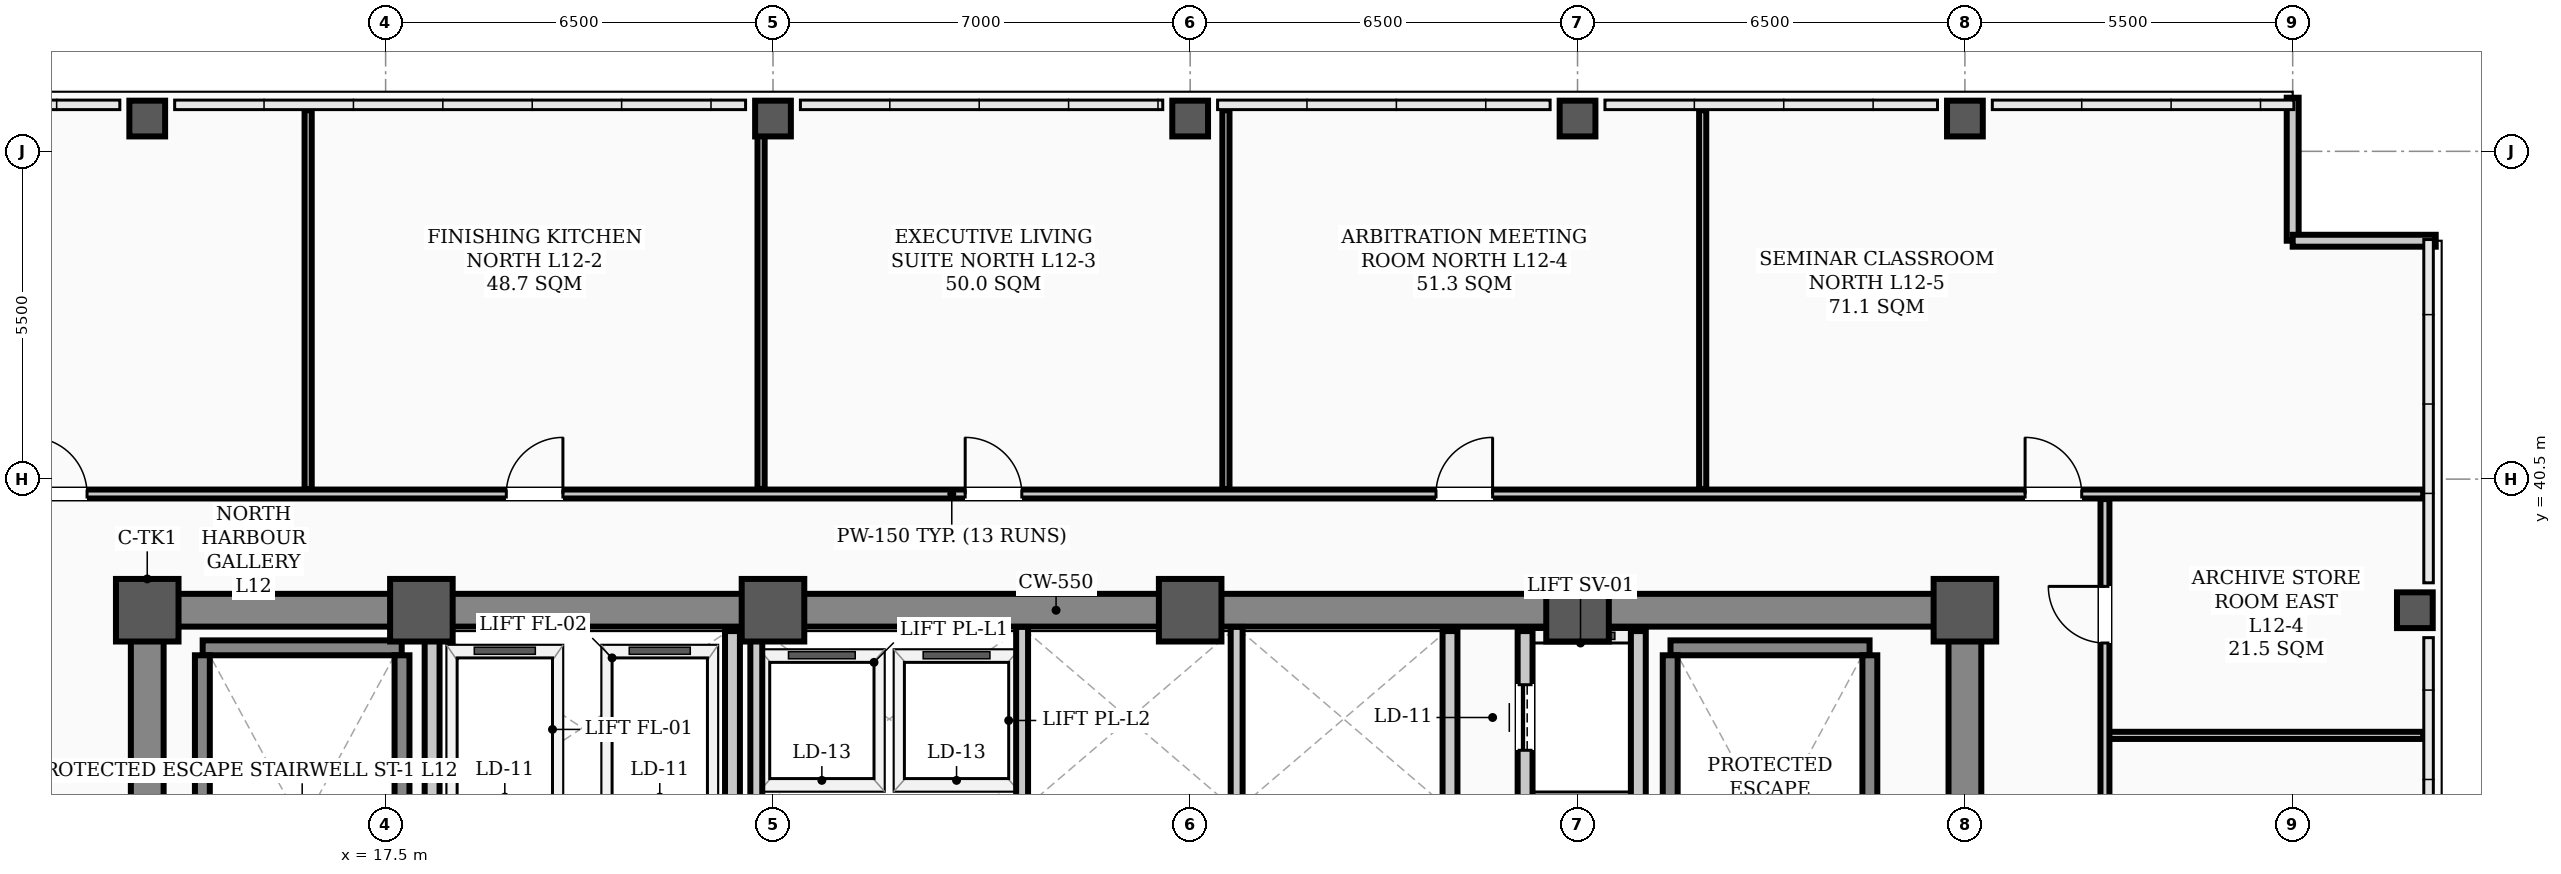
"""IFC4 building model, lengths in metres.
Left out: names, types, materials, properties, quantities, classifications, styles, units other than length and angle.
Written with IfcOpenShell. Run it as: python <this file> out.ifc"""

import sys

from ifc_helpers import new_model, si_unit, direction, frame, frame_2d, origin, origin_2d, place, context, subcontext, project, spatial, rectangle, hollow_rectangle, extrude, element, fill, save


model = new_model("IFC4")
c1 = context("Model", 3, precision=1e-05, world=origin(), true_north=direction((0.0, 1.0)))
c2 = subcontext(c1, "Body", "Model", "MODEL_VIEW")
j1 = project(units=[si_unit("LENGTHUNIT", "METRE"), si_unit("PLANEANGLEUNIT", "RADIAN")], contexts=[c1])
p1 = place(None, origin())
s1 = spatial("IfcSite", under=j1, at=p1, CompositionType="ELEMENT")
p2 = place(p1, origin())
s2 = spatial("IfcBuilding", under=s1, at=p2, CompositionType="ELEMENT")
p3 = place(p2, frame((0.0, 0.0, 49.9)))
s3 = spatial("IfcBuildingStorey", under=s2, at=p3, CompositionType="ELEMENT", Elevation=49.9)
for number, where, z_axis, x_axis in (
    (1, (13.5, 38.3, 0.0), (0.0, 0.0, 1.0), (1.0, 0.0, 0.0)),
    (2, (18.1, 38.3, 0.0), (0.0, 0.0, 1.0), (1.0, 0.0, 0.0)),
    (3, (24.0, 38.3, 0.0), (0.0, 0.0, 1.0), (1.0, 0.0, 0.0)),
    (4, (31.0, 38.3, 0.0), (0.0, 0.0, 1.0), (1.0, 0.0, 0.0)),
    (5, (37.5, 38.3, 0.0), (0.0, 0.0, 1.0), (1.0, 0.0, 0.0)),
    (6, (44.0, 38.3, 0.0), (0.0, 0.0, 1.0), (1.0, 0.0, 0.0)),
):
    element("IfcColumn", number, at=place(p3, frame(where, z_axis=z_axis, x_axis=x_axis)), inside=s3, PredefinedType="COLUMN", context=c2, shape_type="SweptSolid", body=[
        extrude(hollow_rectangle(XDim=1.05, YDim=1.05, WallThickness=0.038, InnerFilletRadius=0.019, OuterFilletRadius=0.057, at=origin_2d()), origin(), (0.0, 0.0, 1.0), 3.9),
    ])
for number, where, z_axis, x_axis in (
    (7, (13.5, 46.55, 0.0), (0.0, 0.0, 1.0), (1.0, 0.0, 0.0)),
    (8, (24.0, 46.55, 0.0), (0.0, 0.0, 1.0), (1.0, 0.0, 0.0)),
    (9, (31.0, 46.55, 0.0), (0.0, 0.0, 1.0), (1.0, 0.0, 0.0)),
    (10, (37.5, 46.55, 0.0), (0.0, 0.0, 1.0), (1.0, 0.0, 0.0)),
    (11, (44.0, 46.55, 0.0), (0.0, 0.0, 1.0), (1.0, 0.0, 0.0)),
    (12, (51.55, 38.3, 0.0), (0.0, 0.0, 1.0), (1.0, 0.0, 0.0)),
):
    element("IfcColumn", number, at=place(p3, frame(where, z_axis=z_axis, x_axis=x_axis)), inside=s3, PredefinedType="COLUMN", context=c2, shape_type="SweptSolid", body=[
        extrude(hollow_rectangle(XDim=0.6, YDim=0.6, WallThickness=0.026, InnerFilletRadius=0.013, OuterFilletRadius=0.039, at=origin_2d()), origin(), (0.0, 0.0, 1.0), 3.9),
    ])
for number, where, z_axis, x_axis in (
    (13, (49.5, 46.9, 0.0), (0.0, 0.0, 1.0), (0.0, -1.0, 0.0)),
    (14, (49.5, 44.5, 0.0), (0.0, 0.0, 1.0), (1.0, 0.0, 0.0)),
):
    element("IfcWall", number, at=place(p3, frame(where, z_axis=z_axis, x_axis=x_axis)), inside=s3, PredefinedType="PARAPET", context=c2, shape_type="SweptSolid", body=[
        extrude(rectangle(XDim=2.4, YDim=0.2, at=frame_2d((1.2, 0.0))), origin(), (0.0, 0.0, 1.0), 1.2),
    ])
p4 = place(p3, frame((13.5, 38.3, 0.0), z_axis=(0.0, 0.0, 1.0), x_axis=(1.0, 0.0, 0.0)))
e15 = element("IfcWall", 15, at=p4, inside=s3, PredefinedType="SHEAR", context=c2, shape_type="SweptSolid", body=[
    extrude(rectangle(XDim=30.5, YDim=0.55, at=frame_2d((15.25, 0.0))), origin(), (0.0, 0.0, 1.0), 3.66),
])
for number, where, z_axis, x_axis in (
    (16, (13.5, 29.35, 0.0), (0.0, 0.0, 1.0), (0.0, 1.0, 0.0)),
    (17, (44.0, 29.35, 0.0), (0.0, 0.0, 1.0), (0.0, 1.0, 0.0)),
):
    element("IfcWall", number, at=place(p3, frame(where, z_axis=z_axis, x_axis=x_axis)), inside=s3, PredefinedType="SHEAR", context=c2, shape_type="SweptSolid", body=[
        extrude(rectangle(XDim=8.6, YDim=0.55, at=frame_2d((4.3, 0.0))), origin(), (0.0, 0.0, 1.0), 3.66),
    ])
p5 = place(p3, frame((14.43, 37.669, 0.0), z_axis=(0.0, 0.0, 1.0), x_axis=(1.0, 0.0, 0.0)))
e18 = element("IfcWall", 18, at=p5, inside=s3, PredefinedType="STANDARD", context=c2, shape_type="SweptSolid", body=[
    extrude(rectangle(XDim=3.34, YDim=0.25, at=frame_2d((1.67, 0.0))), origin(), (0.0, 0.0, 1.0), 3.66),
])
for number, where, z_axis, x_axis in (
    (19, (14.425, 30.36, 0.0), (0.0, 0.0, 1.0), (0.0, 1.0, 0.0)),
    (20, (17.775, 30.36, 0.0), (0.0, 0.0, 1.0), (0.0, 1.0, 0.0)),
):
    element("IfcWall", number, at=place(p3, frame(where, z_axis=z_axis, x_axis=x_axis)), inside=s3, PredefinedType="STANDARD", context=c2, shape_type="SweptSolid", body=[
        extrude(rectangle(XDim=7.184, YDim=0.25, at=frame_2d((3.592, 0.0))), origin(), (0.0, 0.0, 1.0), 3.66),
    ])
p6 = place(p3, frame((39.06, 37.669, 0.0), z_axis=(0.0, 0.0, 1.0), x_axis=(1.0, 0.0, 0.0)))
e21 = element("IfcWall", 21, at=p6, inside=s3, PredefinedType="STANDARD", context=c2, shape_type="SweptSolid", body=[
    extrude(rectangle(XDim=3.34, YDim=0.25, at=frame_2d((1.67, 0.0))), origin(), (0.0, 0.0, 1.0), 3.66),
])
for number, where, z_axis, x_axis in (
    (22, (39.055, 30.36, 0.0), (0.0, 0.0, 1.0), (0.0, 1.0, 0.0)),
    (23, (42.405, 30.36, 0.0), (0.0, 0.0, 1.0), (0.0, 1.0, 0.0)),
):
    element("IfcWall", number, at=place(p3, frame(where, z_axis=z_axis, x_axis=x_axis)), inside=s3, PredefinedType="STANDARD", context=c2, shape_type="SweptSolid", body=[
        extrude(rectangle(XDim=7.184, YDim=0.25, at=frame_2d((3.592, 0.0))), origin(), (0.0, 0.0, 1.0), 3.66),
    ])
p7 = place(p3, frame((36.62, 31.95, 0.0), z_axis=(0.0, 0.0, 1.0), x_axis=(0.0, 1.0, 0.0)))
e24 = element("IfcWall", 24, at=p7, inside=s3, PredefinedType="STANDARD", context=c2, shape_type="SweptSolid", body=[
    extrude(rectangle(XDim=6.0, YDim=0.25, at=frame_2d((3.0, 0.0))), origin(), (0.0, 0.0, 1.0), 2.24),
])
p8 = place(p7, frame((0.9, 0.0, 0.0)))
e25 = element("IfcOpeningElement", 25, at=p8, cuts=e24, PredefinedType="OPENING", context=c2, shape_type="SweptSolid", body=[
    extrude(rectangle(XDim=1.1, YDim=2.08, at=frame_2d((0.55, 1.04))), frame((0.0, 0.135, 0.0), z_axis=(0.0, -1.0, 0.0), x_axis=(1.0, 0.0, 0.0)), (0.0, 0.0, 1.0), 0.27),
])
p9 = place(p7, frame((4.0, 0.0, 0.0)))
e26 = element("IfcOpeningElement", 26, at=p9, cuts=e24, PredefinedType="OPENING", context=c2, shape_type="SweptSolid", body=[
    extrude(rectangle(XDim=1.1, YDim=2.08, at=frame_2d((0.55, 1.04))), frame((0.0, 0.135, 0.0), z_axis=(0.0, -1.0, 0.0), x_axis=(1.0, 0.0, 0.0)), (0.0, 0.0, 1.0), 0.27),
])
p10 = place(p3, frame((38.52, 31.95, 0.0), z_axis=(0.0, 0.0, 1.0), x_axis=(0.0, 1.0, 0.0)))
e27 = element("IfcWall", 27, at=p10, inside=s3, PredefinedType="STANDARD", context=c2, shape_type="SweptSolid", body=[
    extrude(rectangle(XDim=6.0, YDim=0.25, at=frame_2d((3.0, 0.0))), origin(), (0.0, 0.0, 1.0), 2.24),
])
for number, where, z_axis, x_axis in (
    (28, (18.28, 34.62, 0.0), (0.0, 0.0, 1.0), (0.0, 1.0, 0.0)),
    (29, (23.32, 34.62, 0.0), (0.0, 0.0, 1.0), (0.0, 1.0, 0.0)),
):
    element("IfcWall", number, at=place(p3, frame(where, z_axis=z_axis, x_axis=x_axis)), inside=s3, PredefinedType="STANDARD", context=c2, shape_type="SweptSolid", body=[
        extrude(rectangle(XDim=3.33, YDim=0.25, at=frame_2d((1.665, 0.0))), origin(), (0.0, 0.0, 1.0), 2.24),
    ])
p11 = place(p3, frame((35.36, 34.9, 0.0), z_axis=(0.0, 0.0, 1.0), x_axis=(0.0, 1.0, 0.0)))
e30 = element("IfcWall", 30, at=p11, inside=s3, PredefinedType="STANDARD", context=c2, shape_type="SweptSolid", body=[
    extrude(rectangle(XDim=3.05, YDim=0.25, at=frame_2d((1.525, 0.0))), origin(), (0.0, 0.0, 1.0), 2.24),
])
p12 = place(p3, frame((46.35, 36.2, 0.0), z_axis=(0.0, 0.0, 1.0), x_axis=(1.0, 0.0, 0.0)))
e31 = element("IfcWall", 31, at=p12, inside=s3, PredefinedType="PARTITIONING", context=c2, shape_type="SweptSolid", body=[
    extrude(rectangle(XDim=5.34, YDim=0.12, at=frame_2d((2.67, 0.0))), origin(), (0.0, 0.0, 1.0), 3.32),
])
p13 = place(p3, frame((2.31, 40.25, 0.0), z_axis=(0.0, 0.0, 1.0), x_axis=(1.0, 0.0, 0.0)))
e32 = element("IfcWall", 32, at=p13, inside=s3, PredefinedType="PARTITIONING", context=c2, shape_type="SweptSolid", body=[
    extrude(rectangle(XDim=49.38, YDim=0.15, at=frame_2d((24.69, 0.0))), origin(), (0.0, 0.0, 1.0), 2.24),
])
p14 = place(p13, frame((9.23, 0.0, 0.0)))
e33 = element("IfcOpeningElement", 33, at=p14, cuts=e32, PredefinedType="OPENING", context=c2, shape_type="SweptSolid", body=[
    extrude(rectangle(XDim=0.95, YDim=2.08, at=frame_2d((0.475, 1.04))), frame((0.0, 0.085, 0.0), z_axis=(0.0, -1.0, 0.0), x_axis=(1.0, 0.0, 0.0)), (0.0, 0.0, 1.0), 0.17),
])
p15 = place(p13, frame((17.215, 0.0, 0.0)))
e34 = element("IfcOpeningElement", 34, at=p15, cuts=e32, PredefinedType="OPENING", context=c2, shape_type="SweptSolid", body=[
    extrude(rectangle(XDim=0.95, YDim=2.08, at=frame_2d((0.475, 1.04))), frame((0.0, 0.085, 0.0), z_axis=(0.0, -1.0, 0.0), x_axis=(1.0, 0.0, 0.0)), (0.0, 0.0, 1.0), 0.17),
])
p16 = place(p13, frame((24.915, 0.0, 0.0)))
e35 = element("IfcOpeningElement", 35, at=p16, cuts=e32, PredefinedType="OPENING", context=c2, shape_type="SweptSolid", body=[
    extrude(rectangle(XDim=0.95, YDim=2.08, at=frame_2d((0.475, 1.04))), frame((0.0, 0.085, 0.0), z_axis=(0.0, -1.0, 0.0), x_axis=(1.0, 0.0, 0.0)), (0.0, 0.0, 1.0), 0.17),
])
p17 = place(p13, frame((32.815, 0.0, 0.0)))
e36 = element("IfcOpeningElement", 36, at=p17, cuts=e32, PredefinedType="OPENING", context=c2, shape_type="SweptSolid", body=[
    extrude(rectangle(XDim=0.95, YDim=2.08, at=frame_2d((0.475, 1.04))), frame((0.0, 0.085, 0.0), z_axis=(0.0, -1.0, 0.0), x_axis=(1.0, 0.0, 0.0)), (0.0, 0.0, 1.0), 0.17),
])
p18 = place(p13, frame((42.7, 0.0, 0.0)))
e37 = element("IfcOpeningElement", 37, at=p18, cuts=e32, PredefinedType="OPENING", context=c2, shape_type="SweptSolid", body=[
    extrude(rectangle(XDim=0.95, YDim=2.08, at=frame_2d((0.475, 1.04))), frame((0.0, 0.085, 0.0), z_axis=(0.0, -1.0, 0.0), x_axis=(1.0, 0.0, 0.0)), (0.0, 0.0, 1.0), 0.17),
])
p19 = place(p3, frame((46.35, 17.635, 0.0), z_axis=(0.0, 0.0, 1.0), x_axis=(0.0, 1.0, 0.0)))
e38 = element("IfcWall", 38, at=p19, inside=s3, PredefinedType="PARTITIONING", context=c2, shape_type="SweptSolid", body=[
    extrude(rectangle(XDim=22.53, YDim=0.15, at=frame_2d((11.265, 0.0))), origin(), (0.0, 0.0, 1.0), 2.24),
])
p20 = place(p19, frame((3.465, 0.0, 0.0)))
e39 = element("IfcOpeningElement", 39, at=p20, cuts=e38, PredefinedType="OPENING", context=c2, shape_type="SweptSolid", body=[
    extrude(rectangle(XDim=0.95, YDim=2.08, at=frame_2d((0.475, 1.04))), frame((0.0, 0.085, 0.0), z_axis=(0.0, -1.0, 0.0), x_axis=(1.0, 0.0, 0.0)), (0.0, 0.0, 1.0), 0.17),
])
p21 = place(p19, frame((8.69, 0.0, 0.0)))
e40 = element("IfcOpeningElement", 40, at=p21, cuts=e38, PredefinedType="OPENING", context=c2, shape_type="SweptSolid", body=[
    extrude(rectangle(XDim=0.95, YDim=2.08, at=frame_2d((0.475, 1.04))), frame((0.0, 0.085, 0.0), z_axis=(0.0, -1.0, 0.0), x_axis=(1.0, 0.0, 0.0)), (0.0, 0.0, 1.0), 0.17),
])
p22 = place(p19, frame((15.69, 0.0, 0.0)))
e41 = element("IfcOpeningElement", 41, at=p22, cuts=e38, PredefinedType="OPENING", context=c2, shape_type="SweptSolid", body=[
    extrude(rectangle(XDim=0.95, YDim=2.08, at=frame_2d((0.475, 1.04))), frame((0.0, 0.085, 0.0), z_axis=(0.0, -1.0, 0.0), x_axis=(1.0, 0.0, 0.0)), (0.0, 0.0, 1.0), 0.17),
])
p23 = place(p19, frame((20.115, 0.0, 0.0)))
e42 = element("IfcOpeningElement", 42, at=p23, cuts=e38, PredefinedType="OPENING", context=c2, shape_type="SweptSolid", body=[
    extrude(rectangle(XDim=0.95, YDim=2.08, at=frame_2d((0.475, 1.04))), frame((0.0, 0.085, 0.0), z_axis=(0.0, -1.0, 0.0), x_axis=(1.0, 0.0, 0.0)), (0.0, 0.0, 1.0), 0.17),
])
for number, where, z_axis, x_axis in (
    (43, (16.2, 40.335, 0.0), (0.0, 0.0, 1.0), (0.0, 1.0, 0.0)),
    (44, (23.8, 40.335, 0.0), (0.0, 0.0, 1.0), (0.0, 1.0, 0.0)),
    (45, (31.6, 40.335, 0.0), (0.0, 0.0, 1.0), (0.0, 1.0, 0.0)),
    (46, (39.6, 40.335, 0.0), (0.0, 0.0, 1.0), (0.0, 1.0, 0.0)),
):
    element("IfcWall", number, at=place(p3, frame(where, z_axis=z_axis, x_axis=x_axis)), inside=s3, PredefinedType="PARTITIONING", context=c2, shape_type="SweptSolid", body=[
        extrude(rectangle(XDim=6.355, YDim=0.12, at=frame_2d((3.177, 0.0))), origin(), (0.0, 0.0, 1.0), 2.24),
    ])
for number, where, z_axis, x_axis in (
    (47, (23.72, 34.9, 0.0), (0.0, 0.0, 1.0), (0.0, 1.0, 0.0)),
    (48, (28.18, 34.9, 0.0), (0.0, 0.0, 1.0), (0.0, 1.0, 0.0)),
    (49, (31.78, 34.9, 0.0), (0.0, 0.0, 1.0), (0.0, 1.0, 0.0)),
):
    element("IfcWall", number, at=place(p3, frame(where, z_axis=z_axis, x_axis=x_axis)), inside=s3, PredefinedType="STANDARD", context=c2, shape_type="SweptSolid", body=[
        extrude(rectangle(XDim=3.12, YDim=0.2, at=frame_2d((1.56, 0.0))), origin(), (0.0, 0.0, 1.0), 2.24),
    ])
p24 = place(p23, origin())
e50 = element("IfcDoor", 50, at=p24, inside=s3, OperationType="SINGLE_SWING_RIGHT", PredefinedType="DOOR", context=c2, shape_type="SweptSolid", body=[
    extrude(rectangle(XDim=0.95, YDim=2.08, at=frame_2d((0.475, 1.04))), frame((0.0, 0.025, 0.0), z_axis=(0.0, -1.0, 0.0), x_axis=(1.0, 0.0, 0.0)), (0.0, 0.0, 1.0), 0.05),
])
fill(e42, e50)
p25 = place(p14, origin())
e51 = element("IfcDoor", 51, at=p25, inside=s3, OperationType="SINGLE_SWING_LEFT", PredefinedType="DOOR", context=c2, shape_type="SweptSolid", body=[
    extrude(rectangle(XDim=0.95, YDim=2.08, at=frame_2d((0.475, 1.04))), frame((0.0, 0.025, 0.0), z_axis=(0.0, -1.0, 0.0), x_axis=(1.0, 0.0, 0.0)), (0.0, 0.0, 1.0), 0.05),
])
fill(e33, e51)
p26 = place(p15, origin())
e52 = element("IfcDoor", 52, at=p26, inside=s3, OperationType="SINGLE_SWING_RIGHT", PredefinedType="DOOR", context=c2, shape_type="SweptSolid", body=[
    extrude(rectangle(XDim=0.95, YDim=2.08, at=frame_2d((0.475, 1.04))), frame((0.0, 0.025, 0.0), z_axis=(0.0, -1.0, 0.0), x_axis=(1.0, 0.0, 0.0)), (0.0, 0.0, 1.0), 0.05),
])
fill(e34, e52)
p27 = place(p16, origin())
e53 = element("IfcDoor", 53, at=p27, inside=s3, OperationType="SINGLE_SWING_LEFT", PredefinedType="DOOR", context=c2, shape_type="SweptSolid", body=[
    extrude(rectangle(XDim=0.95, YDim=2.08, at=frame_2d((0.475, 1.04))), frame((0.0, 0.025, 0.0), z_axis=(0.0, -1.0, 0.0), x_axis=(1.0, 0.0, 0.0)), (0.0, 0.0, 1.0), 0.05),
])
fill(e35, e53)
p28 = place(p17, origin())
e54 = element("IfcDoor", 54, at=p28, inside=s3, OperationType="SINGLE_SWING_RIGHT", PredefinedType="DOOR", context=c2, shape_type="SweptSolid", body=[
    extrude(rectangle(XDim=0.95, YDim=2.08, at=frame_2d((0.475, 1.04))), frame((0.0, 0.025, 0.0), z_axis=(0.0, -1.0, 0.0), x_axis=(1.0, 0.0, 0.0)), (0.0, 0.0, 1.0), 0.05),
])
fill(e36, e54)
p29 = place(p18, origin())
e55 = element("IfcDoor", 55, at=p29, inside=s3, OperationType="SINGLE_SWING_LEFT", PredefinedType="DOOR", context=c2, shape_type="SweptSolid", body=[
    extrude(rectangle(XDim=0.95, YDim=2.08, at=frame_2d((0.475, 1.04))), frame((0.0, 0.025, 0.0), z_axis=(0.0, -1.0, 0.0), x_axis=(1.0, 0.0, 0.0)), (0.0, 0.0, 1.0), 0.05),
])
fill(e37, e55)
p30 = place(p9, origin())
e56 = element("IfcDoor", 56, at=p30, inside=s3, OperationType="SLIDING_TO_LEFT", PredefinedType="DOOR", context=c2, shape_type="SweptSolid", body=[
    extrude(rectangle(XDim=1.1, YDim=2.08, at=frame_2d((0.55, 1.04))), frame((0.0, 0.025, 0.0), z_axis=(0.0, -1.0, 0.0), x_axis=(1.0, 0.0, 0.0)), (0.0, 0.0, 1.0), 0.05),
])
fill(e26, e56)
save(model, sys.argv[1])
